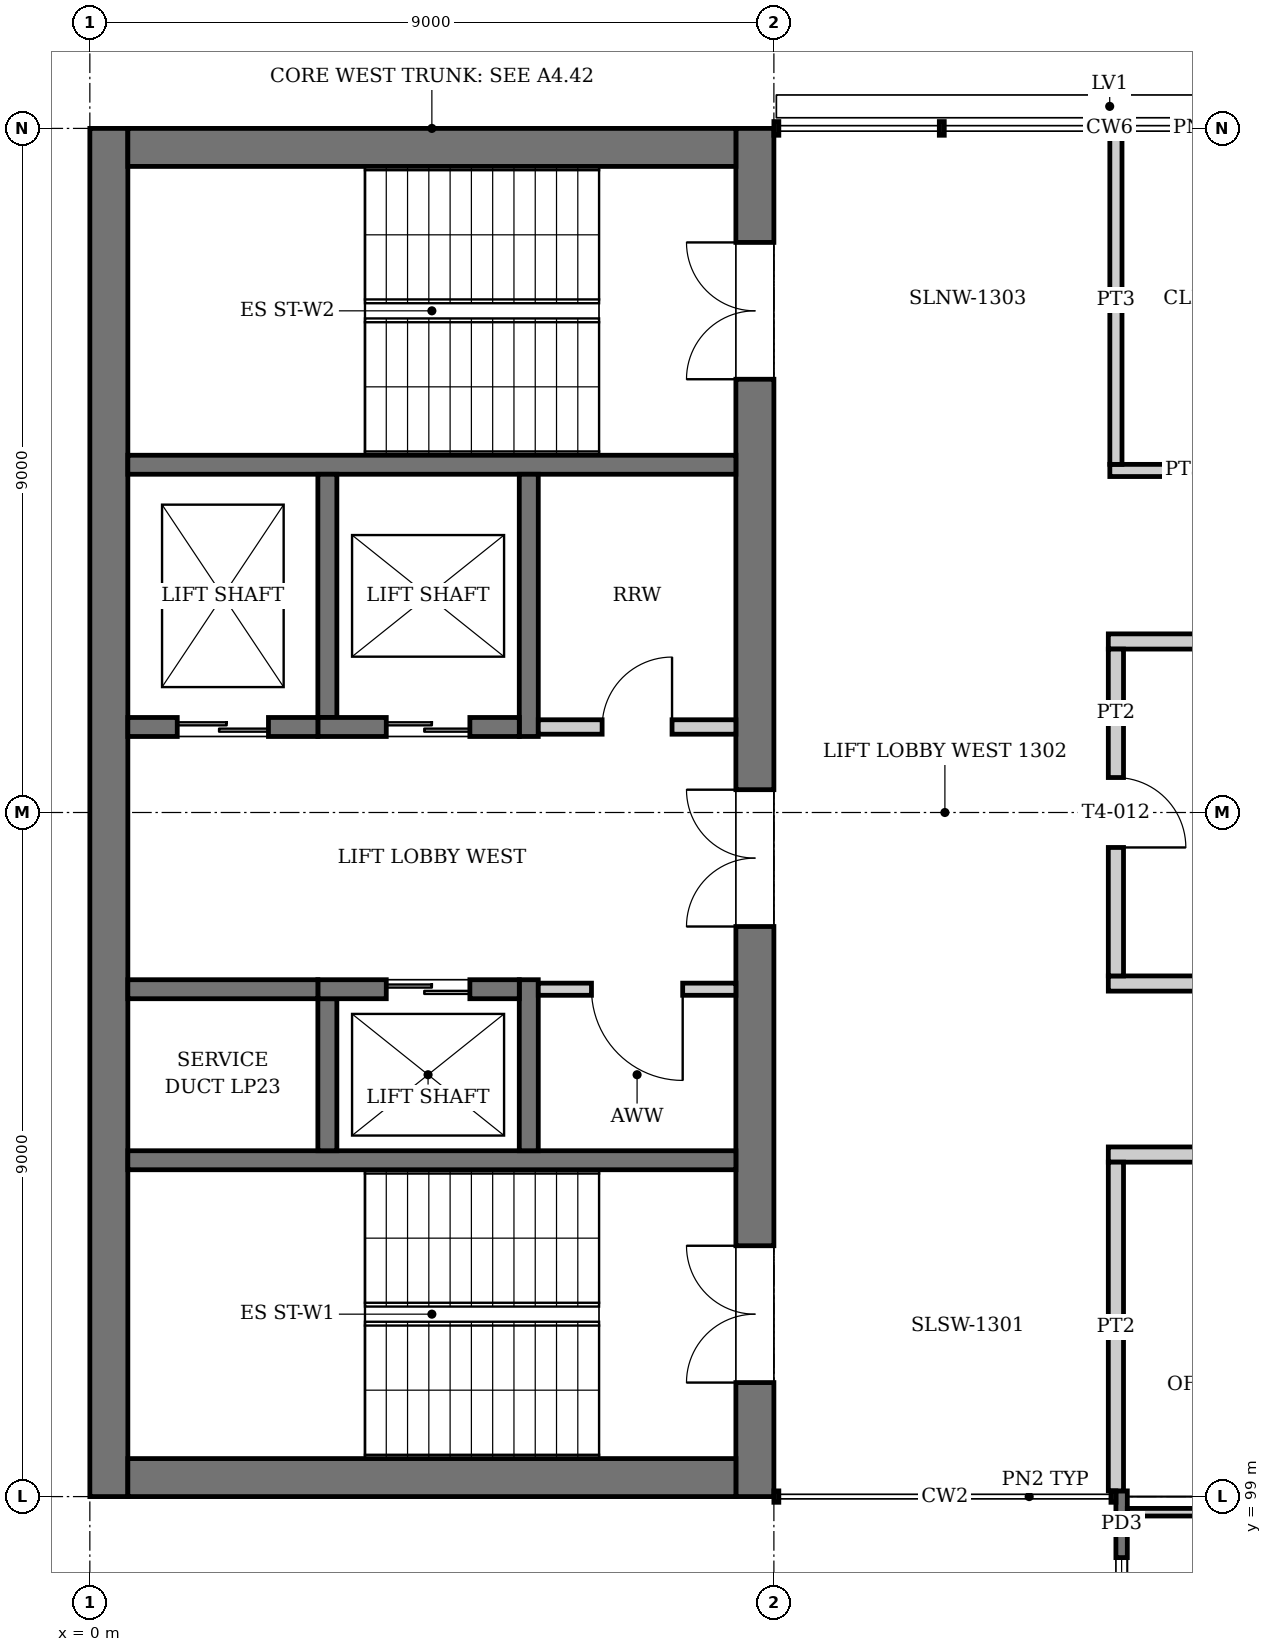
"""IFC4 building model, lengths in metres.
Left out: names, types, materials, properties, quantities, classifications, styles, units other than length and angle.
Written with IfcOpenShell. Run it as: python <this file> out.ifc"""

import sys

from ifc_helpers import new_model, si_unit, direction, frame, frame_2d, origin, place, context, subcontext, project, spatial, rectangle, extrude, element, fill, save


model = new_model("IFC4")
c1 = context("Model", 3, precision=1e-05, world=origin(), true_north=direction((0.0, 1.0)))
c2 = subcontext(c1, "Body", "Model", "MODEL_VIEW")
j1 = project(units=[si_unit("LENGTHUNIT", "METRE"), si_unit("PLANEANGLEUNIT", "RADIAN")], contexts=[c1])
p1 = place(None, origin())
s1 = spatial("IfcSite", under=j1, at=p1, CompositionType="ELEMENT")
p2 = place(p1, origin())
s2 = spatial("IfcBuilding", under=s1, at=p2, CompositionType="ELEMENT")
p3 = place(p2, frame((0.0, 0.0, 55.2)))
s3 = spatial("IfcBuildingStorey", under=s2, at=p3, CompositionType="ELEMENT", Elevation=55.2)
p4 = place(p3, frame((0.25, 99.0, 0.0), z_axis=(0.0, 0.0, 1.0), x_axis=(0.0, 1.0, 0.0)))
e1 = element("IfcWall", 1, at=p4, inside=s3, PredefinedType="SHEAR", context=c2, shape_type="SweptSolid", body=[
    extrude(rectangle(XDim=18.0, YDim=0.5, at=frame_2d((9.0, 0.0))), origin(), (0.0, 0.0, 1.0), 4.0),
])
p5 = place(p3, frame((8.75, 99.0, 0.0), z_axis=(0.0, 0.0, 1.0), x_axis=(0.0, 1.0, 0.0)))
e2 = element("IfcWall", 2, at=p5, inside=s3, PredefinedType="SHEAR", context=c2, shape_type="SweptSolid", body=[
    extrude(rectangle(XDim=18.0, YDim=0.5, at=frame_2d((9.0, 0.0))), origin(), (0.0, 0.0, 1.0), 4.0),
])
p6 = place(p5, frame((1.5, 0.0, 0.0)))
e3 = element("IfcOpeningElement", 3, at=p6, cuts=e2, PredefinedType="OPENING", context=c2, shape_type="SweptSolid", body=[
    extrude(rectangle(XDim=1.8, YDim=2.1, at=frame_2d((0.9, 1.05))), frame((0.0, 0.26, 0.0), z_axis=(0.0, -1.0, 0.0), x_axis=(1.0, 0.0, 0.0)), (0.0, 0.0, 1.0), 0.52),
])
p7 = place(p5, frame((14.7, 0.0, 0.0)))
e4 = element("IfcOpeningElement", 4, at=p7, cuts=e2, PredefinedType="OPENING", context=c2, shape_type="SweptSolid", body=[
    extrude(rectangle(XDim=1.8, YDim=2.1, at=frame_2d((0.9, 1.05))), frame((0.0, 0.26, 0.0), z_axis=(0.0, -1.0, 0.0), x_axis=(1.0, 0.0, 0.0)), (0.0, 0.0, 1.0), 0.52),
])
p8 = place(p5, frame((7.5, 0.0, 0.0)))
e5 = element("IfcOpeningElement", 5, at=p8, cuts=e2, PredefinedType="OPENING", context=c2, shape_type="SweptSolid", body=[
    extrude(rectangle(XDim=1.8, YDim=2.1, at=frame_2d((0.9, 1.05))), frame((0.0, 0.26, 0.0), z_axis=(0.0, -1.0, 0.0), x_axis=(1.0, 0.0, 0.0)), (0.0, 0.0, 1.0), 0.52),
])
for number, where, z_axis, x_axis in (
    (6, (0.5, 99.25, 0.0), (0.0, 0.0, 1.0), (1.0, 0.0, 0.0)),
    (7, (0.5, 116.75, 0.0), (0.0, 0.0, 1.0), (1.0, 0.0, 0.0)),
):
    element("IfcWall", number, at=place(p3, frame(where, z_axis=z_axis, x_axis=x_axis)), inside=s3, PredefinedType="SHEAR", context=c2, shape_type="SweptSolid", body=[
        extrude(rectangle(XDim=8.0, YDim=0.5, at=frame_2d((4.0, 0.0))), origin(), (0.0, 0.0, 1.0), 4.0),
    ])
p9 = place(p3, frame((13.575, 95.55, -0.15), z_axis=(0.0, 0.0, 1.0), x_axis=(0.0, 1.0, 0.0)))
e8 = element("IfcWall", 8, at=p9, inside=s3, PredefinedType="SOLIDWALL", context=c2, shape_type="SweptSolid", body=[
    extrude(rectangle(XDim=3.525, YDim=0.15, at=frame_2d((1.762, 0.0))), origin(), (0.0, 0.0, 1.0), 2.75),
])
p10 = place(p9, frame((0.647, 0.0, 1.05)))
e9 = element("IfcOpeningElement", 9, at=p10, cuts=e8, PredefinedType="OPENING", context=c2, shape_type="SweptSolid", body=[
    extrude(rectangle(XDim=2.0, YDim=1.4, at=frame_2d((1.0, 0.7))), frame((0.0, 0.085, 0.0), z_axis=(0.0, -1.0, 0.0), x_axis=(1.0, 0.0, 0.0)), (0.0, 0.0, 1.0), 0.17),
])
p11 = place(p3, frame((13.65, 98.794, 0.0), z_axis=(0.0, 0.0, 1.0), x_axis=(1.0, 0.0, 0.0)))
e10 = element("IfcWall", 10, at=p11, inside=s3, PredefinedType="PARTITIONING", context=c2, shape_type="SweptSolid", body=[
    extrude(rectangle(XDim=8.7, YDim=0.1, at=frame_2d((4.35, 0.0))), origin(), (0.0, 0.0, 1.0), 2.6),
])
p12 = place(p11, frame((4.6, 0.0, 0.0)))
e11 = element("IfcOpeningElement", 11, at=p12, cuts=e10, PredefinedType="OPENING", context=c2, shape_type="SweptSolid", body=[
    extrude(rectangle(XDim=0.9, YDim=2.1, at=frame_2d((0.45, 1.05))), frame((0.0, 0.06, 0.0), z_axis=(0.0, -1.0, 0.0), x_axis=(1.0, 0.0, 0.0)), (0.0, 0.0, 1.0), 0.12),
])
for number, where, z_axis, x_axis in (
    (12, (8.5, 103.425, 0.0), (0.0, 0.0, 1.0), (-1.0, 0.0, 0.0)),
    (13, (8.5, 112.575, 0.0), (0.0, 0.0, 1.0), (-1.0, 0.0, 0.0)),
):
    element("IfcWall", number, at=place(p3, frame(where, z_axis=z_axis, x_axis=x_axis)), inside=s3, PredefinedType="SOLIDWALL", context=c2, shape_type="SweptSolid", body=[
        extrude(rectangle(XDim=8.0, YDim=0.25, at=frame_2d((4.0, 0.0))), origin(), (0.0, 0.0, 1.0), 3.75),
    ])
p13 = place(p3, frame((5.775, 103.55, 0.0), z_axis=(0.0, 0.0, 1.0), x_axis=(0.0, 1.0, 0.0)))
e14 = element("IfcWall", 14, at=p13, inside=s3, PredefinedType="SOLIDWALL", context=c2, shape_type="SweptSolid", body=[
    extrude(rectangle(XDim=2.25, YDim=0.25, at=frame_2d((1.125, 0.0))), origin(), (0.0, 0.0, 1.0), 4.0),
])
p14 = place(p3, frame((3.125, 103.55, 0.0), z_axis=(0.0, 0.0, 1.0), x_axis=(0.0, 1.0, 0.0)))
e15 = element("IfcWall", 15, at=p14, inside=s3, PredefinedType="SOLIDWALL", context=c2, shape_type="SweptSolid", body=[
    extrude(rectangle(XDim=2.0, YDim=0.25, at=frame_2d((1.0, 0.0))), origin(), (0.0, 0.0, 1.0), 4.0),
])
p15 = place(p3, frame((5.65, 105.675, 0.0), z_axis=(0.0, 0.0, 1.0), x_axis=(-1.0, 0.0, 0.0)))
e16 = element("IfcWall", 16, at=p15, inside=s3, PredefinedType="SOLIDWALL", context=c2, shape_type="SweptSolid", body=[
    extrude(rectangle(XDim=2.65, YDim=0.25, at=frame_2d((1.325, 0.0))), origin(), (0.0, 0.0, 1.0), 4.0),
])
p16 = place(p15, frame((0.65, 0.0, 0.0)))
e17 = element("IfcOpeningElement", 17, at=p16, cuts=e16, PredefinedType="OPENING", context=c2, shape_type="SweptSolid", body=[
    extrude(rectangle(XDim=1.1, YDim=2.1, at=frame_2d((0.55, 1.05))), frame((0.0, 0.135, 0.0), z_axis=(0.0, -1.0, 0.0), x_axis=(1.0, 0.0, 0.0)), (0.0, 0.0, 1.0), 0.27),
])
p17 = place(p3, frame((3.0, 105.675, 0.0), z_axis=(0.0, 0.0, 1.0), x_axis=(-1.0, 0.0, 0.0)))
e18 = element("IfcWall", 18, at=p17, inside=s3, PredefinedType="SOLIDWALL", context=c2, shape_type="SweptSolid", body=[
    extrude(rectangle(XDim=2.5, YDim=0.25, at=frame_2d((1.25, 0.0))), origin(), (0.0, 0.0, 1.0), 4.0),
])
p18 = place(p3, frame((5.775, 109.0, 0.0), z_axis=(0.0, 0.0, 1.0), x_axis=(0.0, 1.0, 0.0)))
e19 = element("IfcWall", 19, at=p18, inside=s3, PredefinedType="SOLIDWALL", context=c2, shape_type="SweptSolid", body=[
    extrude(rectangle(XDim=3.45, YDim=0.25, at=frame_2d((1.725, 0.0))), origin(), (0.0, 0.0, 1.0), 4.0),
])
p19 = place(p3, frame((3.125, 109.25, 0.0), z_axis=(0.0, 0.0, 1.0), x_axis=(0.0, 1.0, 0.0)))
e20 = element("IfcWall", 20, at=p19, inside=s3, PredefinedType="SOLIDWALL", context=c2, shape_type="SweptSolid", body=[
    extrude(rectangle(XDim=3.2, YDim=0.25, at=frame_2d((1.6, 0.0))), origin(), (0.0, 0.0, 1.0), 4.0),
])
p20 = place(p3, frame((5.65, 109.125, 0.0), z_axis=(0.0, 0.0, 1.0), x_axis=(-1.0, 0.0, 0.0)))
e21 = element("IfcWall", 21, at=p20, inside=s3, PredefinedType="SOLIDWALL", context=c2, shape_type="SweptSolid", body=[
    extrude(rectangle(XDim=2.65, YDim=0.25, at=frame_2d((1.325, 0.0))), origin(), (0.0, 0.0, 1.0), 4.0),
])
p21 = place(p20, frame((0.65, 0.0, 0.0)))
e22 = element("IfcOpeningElement", 22, at=p21, cuts=e21, PredefinedType="OPENING", context=c2, shape_type="SweptSolid", body=[
    extrude(rectangle(XDim=1.1, YDim=2.1, at=frame_2d((0.55, 1.05))), frame((0.0, 0.135, 0.0), z_axis=(0.0, -1.0, 0.0), x_axis=(1.0, 0.0, 0.0)), (0.0, 0.0, 1.0), 0.27),
])
p22 = place(p3, frame((3.0, 109.125, 0.0), z_axis=(0.0, 0.0, 1.0), x_axis=(-1.0, 0.0, 0.0)))
e23 = element("IfcWall", 23, at=p22, inside=s3, PredefinedType="SOLIDWALL", context=c2, shape_type="SweptSolid", body=[
    extrude(rectangle(XDim=2.5, YDim=0.25, at=frame_2d((1.25, 0.0))), origin(), (0.0, 0.0, 1.0), 4.0),
])
p23 = place(p22, frame((0.65, 0.0, 0.0)))
e24 = element("IfcOpeningElement", 24, at=p23, cuts=e23, PredefinedType="OPENING", context=c2, shape_type="SweptSolid", body=[
    extrude(rectangle(XDim=1.2, YDim=2.1, at=frame_2d((0.6, 1.05))), frame((0.0, 0.135, 0.0), z_axis=(0.0, -1.0, 0.0), x_axis=(1.0, 0.0, 0.0)), (0.0, 0.0, 1.0), 0.27),
])
p24 = place(p3, frame((8.5, 105.675, 0.0), z_axis=(0.0, 0.0, 1.0), x_axis=(-1.0, 0.0, 0.0)))
e25 = element("IfcWall", 25, at=p24, inside=s3, PredefinedType="PARTITIONING", context=c2, shape_type="SweptSolid", body=[
    extrude(rectangle(XDim=2.6, YDim=0.16, at=frame_2d((1.3, 0.0))), origin(), (0.0, 0.0, 1.0), 3.75),
])
p25 = place(p24, frame((0.7, 0.0, 0.0)))
e26 = element("IfcOpeningElement", 26, at=p25, cuts=e25, PredefinedType="OPENING", context=c2, shape_type="SweptSolid", body=[
    extrude(rectangle(XDim=1.2, YDim=2.1, at=frame_2d((0.6, 1.05))), frame((0.0, 0.09, 0.0), z_axis=(0.0, -1.0, 0.0), x_axis=(1.0, 0.0, 0.0)), (0.0, 0.0, 1.0), 0.18),
])
p26 = place(p3, frame((8.5, 109.125, 0.0), z_axis=(0.0, 0.0, 1.0), x_axis=(-1.0, 0.0, 0.0)))
e27 = element("IfcWall", 27, at=p26, inside=s3, PredefinedType="PARTITIONING", context=c2, shape_type="SweptSolid", body=[
    extrude(rectangle(XDim=2.6, YDim=0.19, at=frame_2d((1.3, 0.0))), origin(), (0.0, 0.0, 1.0), 3.75),
])
p27 = place(p26, frame((0.84, 0.0, 0.0)))
e28 = element("IfcOpeningElement", 28, at=p27, cuts=e27, PredefinedType="OPENING", context=c2, shape_type="SweptSolid", body=[
    extrude(rectangle(XDim=0.92, YDim=2.1, at=frame_2d((0.46, 1.05))), frame((0.0, 0.105, 0.0), z_axis=(0.0, -1.0, 0.0), x_axis=(1.0, 0.0, 0.0)), (0.0, 0.0, 1.0), 0.21),
])
p28 = place(p3, frame((13.4, 103.5, 0.0), z_axis=(0.0, 0.0, 1.0), x_axis=(1.0, 0.0, 0.0)))
e29 = element("IfcWall", 29, at=p28, inside=s3, PredefinedType="PARTITIONING", context=c2, shape_type="SweptSolid", body=[
    extrude(rectangle(XDim=27.2, YDim=0.2, at=frame_2d((13.6, 0.0))), origin(), (0.0, 0.0, 1.0), 3.05),
])
p29 = place(p28, frame((1.85, 0.0, 0.0)))
e30 = element("IfcOpeningElement", 30, at=p29, cuts=e29, PredefinedType="OPENING", context=c2, shape_type="SweptSolid", body=[
    extrude(rectangle(XDim=1.0, YDim=2.1, at=frame_2d((0.5, 1.05))), frame((0.0, 0.11, 0.0), z_axis=(0.0, -1.0, 0.0), x_axis=(1.0, 0.0, 0.0)), (0.0, 0.0, 1.0), 0.22),
])
p30 = place(p28, frame((6.35, 0.0, 0.0)))
e31 = element("IfcOpeningElement", 31, at=p30, cuts=e29, PredefinedType="OPENING", context=c2, shape_type="SweptSolid", body=[
    extrude(rectangle(XDim=1.0, YDim=2.1, at=frame_2d((0.5, 1.05))), frame((0.0, 0.11, 0.0), z_axis=(0.0, -1.0, 0.0), x_axis=(1.0, 0.0, 0.0)), (0.0, 0.0, 1.0), 0.22),
])
p31 = place(p28, frame((10.85, 0.0, 0.0)))
e32 = element("IfcOpeningElement", 32, at=p31, cuts=e29, PredefinedType="OPENING", context=c2, shape_type="SweptSolid", body=[
    extrude(rectangle(XDim=1.0, YDim=2.1, at=frame_2d((0.5, 1.05))), frame((0.0, 0.11, 0.0), z_axis=(0.0, -1.0, 0.0), x_axis=(1.0, 0.0, 0.0)), (0.0, 0.0, 1.0), 0.22),
])
p32 = place(p28, frame((15.35, 0.0, 0.0)))
e33 = element("IfcOpeningElement", 33, at=p32, cuts=e29, PredefinedType="OPENING", context=c2, shape_type="SweptSolid", body=[
    extrude(rectangle(XDim=1.0, YDim=2.1, at=frame_2d((0.5, 1.05))), frame((0.0, 0.11, 0.0), z_axis=(0.0, -1.0, 0.0), x_axis=(1.0, 0.0, 0.0)), (0.0, 0.0, 1.0), 0.22),
])
p33 = place(p28, frame((19.85, 0.0, 0.0)))
e34 = element("IfcOpeningElement", 34, at=p33, cuts=e29, PredefinedType="OPENING", context=c2, shape_type="SweptSolid", body=[
    extrude(rectangle(XDim=1.0, YDim=2.1, at=frame_2d((0.5, 1.05))), frame((0.0, 0.11, 0.0), z_axis=(0.0, -1.0, 0.0), x_axis=(1.0, 0.0, 0.0)), (0.0, 0.0, 1.0), 0.22),
])
p34 = place(p28, frame((24.45, 0.0, 0.0)))
e35 = element("IfcOpeningElement", 35, at=p34, cuts=e29, PredefinedType="OPENING", context=c2, shape_type="SweptSolid", body=[
    extrude(rectangle(XDim=0.8, YDim=2.1, at=frame_2d((0.4, 1.05))), frame((0.0, 0.11, 0.0), z_axis=(0.0, -1.0, 0.0), x_axis=(1.0, 0.0, 0.0)), (0.0, 0.0, 1.0), 0.22),
])
p35 = place(p3, frame((13.4, 105.75, 0.0), z_axis=(0.0, 0.0, 1.0), x_axis=(1.0, 0.0, 0.0)))
e36 = element("IfcWall", 36, at=p35, inside=s3, PredefinedType="PARTITIONING", context=c2, shape_type="SweptSolid", body=[
    extrude(rectangle(XDim=27.2, YDim=0.2, at=frame_2d((13.6, 0.0))), origin(), (0.0, 0.0, 1.0), 3.05),
])
p36 = place(p35, frame((12.9, 0.0, 0.0)))
e37 = element("IfcOpeningElement", 37, at=p36, cuts=e36, PredefinedType="OPENING", context=c2, shape_type="SweptSolid", body=[
    extrude(rectangle(XDim=1.4, YDim=2.1, at=frame_2d((0.7, 1.05))), frame((0.0, 0.11, 0.0), z_axis=(0.0, -1.0, 0.0), x_axis=(1.0, 0.0, 0.0)), (0.0, 0.0, 1.0), 0.22),
])
p37 = place(p3, frame((13.4, 110.25, 0.0), z_axis=(0.0, 0.0, 1.0), x_axis=(1.0, 0.0, 0.0)))
e38 = element("IfcWall", 38, at=p37, inside=s3, PredefinedType="PARTITIONING", context=c2, shape_type="SweptSolid", body=[
    extrude(rectangle(XDim=27.2, YDim=0.2, at=frame_2d((13.6, 0.0))), origin(), (0.0, 0.0, 1.0), 3.05),
])
p38 = place(p37, frame((12.9, 0.0, 0.0)))
e39 = element("IfcOpeningElement", 39, at=p38, cuts=e38, PredefinedType="OPENING", context=c2, shape_type="SweptSolid", body=[
    extrude(rectangle(XDim=1.4, YDim=2.1, at=frame_2d((0.7, 1.05))), frame((0.0, 0.11, 0.0), z_axis=(0.0, -1.0, 0.0), x_axis=(1.0, 0.0, 0.0)), (0.0, 0.0, 1.0), 0.22),
])
p39 = place(p3, frame((13.42, 112.5, 0.0), z_axis=(0.0, 0.0, 1.0), x_axis=(1.0, 0.0, 0.0)))
e40 = element("IfcWall", 40, at=p39, inside=s3, PredefinedType="PARTITIONING", context=c2, shape_type="SweptSolid", body=[
    extrude(rectangle(XDim=4.66, YDim=0.16, at=frame_2d((2.33, 0.0))), origin(), (0.0, 0.0, 1.0), 3.05),
])
p40 = place(p39, frame((1.955, 0.0, 0.0)))
e41 = element("IfcOpeningElement", 41, at=p40, cuts=e40, PredefinedType="OPENING", context=c2, shape_type="SweptSolid", body=[
    extrude(rectangle(XDim=0.75, YDim=2.1, at=frame_2d((0.375, 1.05))), frame((0.0, 0.09, 0.0), z_axis=(0.0, -1.0, 0.0), x_axis=(1.0, 0.0, 0.0)), (0.0, 0.0, 1.0), 0.18),
])
p41 = place(p3, frame((13.5, 99.075, 0.0), z_axis=(0.0, 0.0, 1.0), x_axis=(0.0, 1.0, 0.0)))
e42 = element("IfcWall", 42, at=p41, inside=s3, PredefinedType="PARTITIONING", context=c2, shape_type="SweptSolid", body=[
    extrude(rectangle(XDim=4.325, YDim=0.2, at=frame_2d((2.163, 0.0))), origin(), (0.0, 0.0, 1.0), 3.05),
])
p42 = place(p3, frame((13.5, 105.85, 0.0), z_axis=(0.0, 0.0, 1.0), x_axis=(0.0, 1.0, 0.0)))
e43 = element("IfcWall", 43, at=p42, inside=s3, PredefinedType="PARTITIONING", context=c2, shape_type="SweptSolid", body=[
    extrude(rectangle(XDim=4.3, YDim=0.2, at=frame_2d((2.15, 0.0))), origin(), (0.0, 0.0, 1.0), 3.05),
])
p43 = place(p42, frame((1.69, 0.0, 0.0)))
e44 = element("IfcOpeningElement", 44, at=p43, cuts=e43, PredefinedType="OPENING", context=c2, shape_type="SweptSolid", body=[
    extrude(rectangle(XDim=0.92, YDim=2.1, at=frame_2d((0.46, 1.05))), frame((0.0, 0.11, 0.0), z_axis=(0.0, -1.0, 0.0), x_axis=(1.0, 0.0, 0.0)), (0.0, 0.0, 1.0), 0.22),
])
p44 = place(p3, frame((13.5, 112.58, 0.0), z_axis=(0.0, 0.0, 1.0), x_axis=(0.0, 1.0, 0.0)))
e45 = element("IfcWall", 45, at=p44, inside=s3, PredefinedType="PARTITIONING", context=c2, shape_type="SweptSolid", body=[
    extrude(rectangle(XDim=4.33, YDim=0.16, at=frame_2d((2.165, 0.0))), origin(), (0.0, 0.0, 1.0), 3.05),
])
p45 = place(p10, origin())
e46 = element("IfcWindow", 46, at=p45, inside=s3, PartitioningType="SINGLE_PANEL", PredefinedType="WINDOW", context=c2, shape_type="SweptSolid", body=[
    extrude(rectangle(XDim=2.0, YDim=1.4, at=frame_2d((1.0, 0.7))), frame((0.0, 0.03, 0.0), z_axis=(0.0, -1.0, 0.0), x_axis=(1.0, 0.0, 0.0)), (0.0, 0.0, 1.0), 0.06),
])
fill(e9, e46)
p46 = place(p16, origin())
e47 = element("IfcDoor", 47, at=p46, inside=s3, OperationType="DOUBLE_DOOR_SLIDING", PredefinedType="DOOR", context=c2, shape_type="SweptSolid", body=[
    extrude(rectangle(XDim=1.1, YDim=2.1, at=frame_2d((0.55, 1.05))), frame((0.0, 0.025, 0.0), z_axis=(0.0, -1.0, 0.0), x_axis=(1.0, 0.0, 0.0)), (0.0, 0.0, 1.0), 0.05),
])
fill(e17, e47)
p47 = place(p21, origin())
e48 = element("IfcDoor", 48, at=p47, inside=s3, OperationType="DOUBLE_DOOR_SLIDING", PredefinedType="DOOR", context=c2, shape_type="SweptSolid", body=[
    extrude(rectangle(XDim=1.1, YDim=2.1, at=frame_2d((0.55, 1.05))), frame((0.0, 0.025, 0.0), z_axis=(0.0, -1.0, 0.0), x_axis=(1.0, 0.0, 0.0)), (0.0, 0.0, 1.0), 0.05),
])
fill(e22, e48)
p48 = place(p23, origin())
e49 = element("IfcDoor", 49, at=p48, inside=s3, OperationType="DOUBLE_DOOR_SLIDING", PredefinedType="DOOR", context=c2, shape_type="SweptSolid", body=[
    extrude(rectangle(XDim=1.2, YDim=2.1, at=frame_2d((0.6, 1.05))), frame((0.0, 0.025, 0.0), z_axis=(0.0, -1.0, 0.0), x_axis=(1.0, 0.0, 0.0)), (0.0, 0.0, 1.0), 0.05),
])
fill(e24, e49)
p49 = place(p43, frame((0.92, 0.0, 0.0), z_axis=(0.0, 0.0, 1.0), x_axis=(-1.0, 0.0, 0.0)))
e50 = element("IfcDoor", 50, at=p49, inside=s3, OperationType="SINGLE_SWING_RIGHT", PredefinedType="DOOR", context=c2, shape_type="SweptSolid", body=[
    extrude(rectangle(XDim=0.92, YDim=2.1, at=frame_2d((0.46, 1.05))), frame((0.0, 0.025, 0.0), z_axis=(0.0, -1.0, 0.0), x_axis=(1.0, 0.0, 0.0)), (0.0, 0.0, 1.0), 0.05),
])
fill(e44, e50)
p50 = place(p6, origin())
e51 = element("IfcDoor", 51, at=p50, inside=s3, OperationType="DOUBLE_DOOR_SINGLE_SWING", PredefinedType="DOOR", context=c2, shape_type="SweptSolid", body=[
    extrude(rectangle(XDim=1.8, YDim=2.1, at=frame_2d((0.9, 1.05))), frame((0.0, 0.025, 0.0), z_axis=(0.0, -1.0, 0.0), x_axis=(1.0, 0.0, 0.0)), (0.0, 0.0, 1.0), 0.05),
])
fill(e3, e51)
p51 = place(p7, origin())
e52 = element("IfcDoor", 52, at=p51, inside=s3, OperationType="DOUBLE_DOOR_SINGLE_SWING", PredefinedType="DOOR", context=c2, shape_type="SweptSolid", body=[
    extrude(rectangle(XDim=1.8, YDim=2.1, at=frame_2d((0.9, 1.05))), frame((0.0, 0.025, 0.0), z_axis=(0.0, -1.0, 0.0), x_axis=(1.0, 0.0, 0.0)), (0.0, 0.0, 1.0), 0.05),
])
fill(e4, e52)
p52 = place(p8, origin())
e53 = element("IfcDoor", 53, at=p52, inside=s3, OperationType="DOUBLE_DOOR_SINGLE_SWING", PredefinedType="DOOR", context=c2, shape_type="SweptSolid", body=[
    extrude(rectangle(XDim=1.8, YDim=2.1, at=frame_2d((0.9, 1.05))), frame((0.0, 0.025, 0.0), z_axis=(0.0, -1.0, 0.0), x_axis=(1.0, 0.0, 0.0)), (0.0, 0.0, 1.0), 0.05),
])
fill(e5, e53)
p53 = place(p25, origin())
e54 = element("IfcDoor", 54, at=p53, inside=s3, OperationType="SINGLE_SWING_LEFT", PredefinedType="DOOR", context=c2, shape_type="SweptSolid", body=[
    extrude(rectangle(XDim=1.2, YDim=2.1, at=frame_2d((0.6, 1.05))), frame((0.0, 0.025, 0.0), z_axis=(0.0, -1.0, 0.0), x_axis=(1.0, 0.0, 0.0)), (0.0, 0.0, 1.0), 0.05),
])
fill(e26, e54)
p54 = place(p27, frame((0.92, 0.0, 0.0), z_axis=(0.0, 0.0, 1.0), x_axis=(-1.0, 0.0, 0.0)))
e55 = element("IfcDoor", 55, at=p54, inside=s3, OperationType="SINGLE_SWING_RIGHT", PredefinedType="DOOR", context=c2, shape_type="SweptSolid", body=[
    extrude(rectangle(XDim=0.92, YDim=2.1, at=frame_2d((0.46, 1.05))), frame((0.0, 0.025, 0.0), z_axis=(0.0, -1.0, 0.0), x_axis=(1.0, 0.0, 0.0)), (0.0, 0.0, 1.0), 0.05),
])
fill(e28, e55)
save(model, sys.argv[1])
